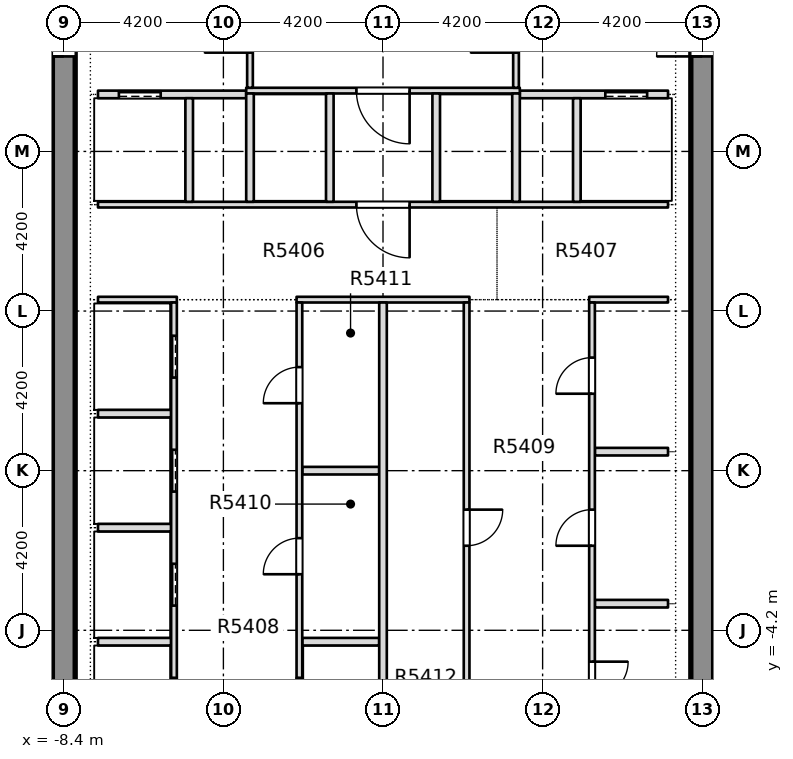
"""IFC4 building model, lengths in metres.
Left out: names, types, materials, properties, quantities, classifications, styles, units other than length and angle.
Written with IfcOpenShell. Run it as: python <this file> out.ifc"""

import sys

from ifc_helpers import new_model, si_unit, direction, frame, frame_2d, origin, place, context, subcontext, project, spatial, rectangle, extrude, element, fill, save


model = new_model("IFC4")
c1 = context("Model", 3, precision=1e-05, world=origin(), true_north=direction((0.0, 1.0)))
c2 = subcontext(c1, "Body", "Model", "MODEL_VIEW")
j1 = project(units=[si_unit("LENGTHUNIT", "METRE"), si_unit("PLANEANGLEUNIT", "RADIAN")], contexts=[c1])
p1 = place(None, origin())
s1 = spatial("IfcSite", under=j1, at=p1, CompositionType="ELEMENT")
p2 = place(p1, origin())
s2 = spatial("IfcBuilding", under=s1, at=p2, CompositionType="ELEMENT")
p3 = place(p2, frame((0.0, 0.0, 206.6)))
s3 = spatial("IfcBuildingStorey", under=s2, at=p3, CompositionType="ELEMENT", Elevation=206.6)
p4 = place(p3, frame((-8.4, -7.8, -0.4), z_axis=(0.0, 0.0, 1.0), x_axis=(0.0, 1.0, 0.0)))
e1 = element("IfcWall", 1, at=p4, inside=s3, PredefinedType="SHEAR", context=c2, shape_type="SweptSolid", body=[
    extrude(rectangle(XDim=28.95, YDim=0.6, at=frame_2d((14.475, 0.0))), origin(), (0.0, 0.0, 1.0), 3.45),
])
p5 = place(p4, frame((18.7, 0.0, 0.4)))
e2 = element("IfcOpeningElement", 2, at=p5, cuts=e1, PredefinedType="OPENING", context=c2, shape_type="SweptSolid", body=[
    extrude(rectangle(XDim=1.2, YDim=2.1, at=frame_2d((0.6, 1.05))), frame((0.0, 0.31, 0.0), z_axis=(0.0, -1.0, 0.0), x_axis=(1.0, 0.0, 0.0)), (0.0, 0.0, 1.0), 0.62),
])
p6 = place(p3, frame((8.4, -7.8, -0.4), z_axis=(0.0, 0.0, 1.0), x_axis=(0.0, 1.0, 0.0)))
e3 = element("IfcWall", 3, at=p6, inside=s3, PredefinedType="SHEAR", context=c2, shape_type="SweptSolid", body=[
    extrude(rectangle(XDim=28.95, YDim=0.6, at=frame_2d((14.475, 0.0))), origin(), (0.0, 0.0, 1.0), 3.45),
])
p7 = place(p6, frame((18.7, 0.0, 0.4)))
e4 = element("IfcOpeningElement", 4, at=p7, cuts=e3, PredefinedType="OPENING", context=c2, shape_type="SweptSolid", body=[
    extrude(rectangle(XDim=1.2, YDim=2.1, at=frame_2d((0.6, 1.05))), frame((0.0, 0.31, 0.0), z_axis=(0.0, -1.0, 0.0), x_axis=(1.0, 0.0, 0.0)), (0.0, 0.0, 1.0), 0.62),
])
p8 = place(p3, frame((-7.5, -4.5, 0.0), z_axis=(0.0, 0.0, 1.0), x_axis=(1.0, 0.0, 0.0)))
e5 = element("IfcWall", 5, at=p8, inside=s3, PredefinedType="PARTITIONING", context=c2, shape_type="SweptSolid", body=[
    extrude(rectangle(XDim=1.925, YDim=0.2, at=frame_2d((0.962, 0.0))), origin(), (0.0, 0.0, 1.0), 3.05),
])
p9 = place(p3, frame((-2.125, -4.5, 0.0), z_axis=(0.0, 0.0, 1.0), x_axis=(1.0, 0.0, 0.0)))
e6 = element("IfcWall", 6, at=p9, inside=s3, PredefinedType="PARTITIONING", context=c2, shape_type="SweptSolid", body=[
    extrude(rectangle(XDim=2.025, YDim=0.2, at=frame_2d((1.012, 0.0))), origin(), (0.0, 0.0, 1.0), 3.05),
])
for number, where, z_axis, x_axis in (
    (7, (5.575, -3.5, 0.0), (0.0, 0.0, 1.0), (1.0, 0.0, 0.0)),
    (8, (-7.5, -1.5, 0.0), (0.0, 0.0, 1.0), (1.0, 0.0, 0.0)),
):
    element("IfcWall", number, at=place(p3, frame(where, z_axis=z_axis, x_axis=x_axis)), inside=s3, PredefinedType="PARTITIONING", context=c2, shape_type="SweptSolid", body=[
        extrude(rectangle(XDim=1.925, YDim=0.2, at=frame_2d((0.962, 0.0))), origin(), (0.0, 0.0, 1.0), 3.05),
    ])
p10 = place(p3, frame((-2.125, 0.0, 0.0), z_axis=(0.0, 0.0, 1.0), x_axis=(1.0, 0.0, 0.0)))
e9 = element("IfcWall", 9, at=p10, inside=s3, PredefinedType="PARTITIONING", context=c2, shape_type="SweptSolid", body=[
    extrude(rectangle(XDim=2.025, YDim=0.2, at=frame_2d((1.012, 0.0))), origin(), (0.0, 0.0, 1.0), 3.05),
])
for number, where, z_axis, x_axis in (
    (10, (5.575, 0.5, 0.0), (0.0, 0.0, 1.0), (1.0, 0.0, 0.0)),
    (11, (-7.5, 1.5, 0.0), (0.0, 0.0, 1.0), (1.0, 0.0, 0.0)),
):
    element("IfcWall", number, at=place(p3, frame(where, z_axis=z_axis, x_axis=x_axis)), inside=s3, PredefinedType="PARTITIONING", context=c2, shape_type="SweptSolid", body=[
        extrude(rectangle(XDim=1.925, YDim=0.2, at=frame_2d((0.962, 0.0))), origin(), (0.0, 0.0, 1.0), 3.05),
    ])
p11 = place(p3, frame((-7.5, 4.5, 0.0), z_axis=(0.0, 0.0, 1.0), x_axis=(1.0, 0.0, 0.0)))
e12 = element("IfcWall", 12, at=p11, inside=s3, PredefinedType="PARTITIONING", context=c2, shape_type="SweptSolid", body=[
    extrude(rectangle(XDim=2.075, YDim=0.15, at=frame_2d((1.038, 0.0))), origin(), (0.0, 0.0, 1.0), 3.05),
])
p12 = place(p3, frame((-2.275, 4.5, 0.0), z_axis=(0.0, 0.0, 1.0), x_axis=(1.0, 0.0, 0.0)))
e13 = element("IfcWall", 13, at=p12, inside=s3, PredefinedType="PARTITIONING", context=c2, shape_type="SweptSolid", body=[
    extrude(rectangle(XDim=4.55, YDim=0.15, at=frame_2d((2.275, 0.0))), origin(), (0.0, 0.0, 1.0), 3.05),
])
p13 = place(p3, frame((5.425, 4.5, 0.0), z_axis=(0.0, 0.0, 1.0), x_axis=(1.0, 0.0, 0.0)))
e14 = element("IfcWall", 14, at=p13, inside=s3, PredefinedType="PARTITIONING", context=c2, shape_type="SweptSolid", body=[
    extrude(rectangle(XDim=2.075, YDim=0.15, at=frame_2d((1.038, 0.0))), origin(), (0.0, 0.0, 1.0), 3.05),
])
p14 = place(p3, frame((-7.5, 7.0, 0.0), z_axis=(0.0, 0.0, 1.0), x_axis=(1.0, 0.0, 0.0)))
e15 = element("IfcWall", 15, at=p14, inside=s3, PredefinedType="PARTITIONING", context=c2, shape_type="SweptSolid", body=[
    extrude(rectangle(XDim=15.0, YDim=0.15, at=frame_2d((7.5, 0.0))), origin(), (0.0, 0.0, 1.0), 3.05),
])
p15 = place(p14, frame((6.8, 0.0, 0.0)))
e16 = element("IfcOpeningElement", 16, at=p15, cuts=e15, PredefinedType="OPENING", context=c2, shape_type="SweptSolid", body=[
    extrude(rectangle(XDim=1.4, YDim=2.1, at=frame_2d((0.7, 1.05))), frame((0.0, 0.085, 0.0), z_axis=(0.0, -1.0, 0.0), x_axis=(1.0, 0.0, 0.0)), (0.0, 0.0, 1.0), 0.17),
])
p16 = place(p3, frame((-7.5, 9.9, 0.0), z_axis=(0.0, 0.0, 1.0), x_axis=(1.0, 0.0, 0.0)))
e17 = element("IfcWall", 17, at=p16, inside=s3, PredefinedType="PARTITIONING", context=c2, shape_type="SweptSolid", body=[
    extrude(rectangle(XDim=3.9, YDim=0.2, at=frame_2d((1.95, 0.0))), origin(), (0.0, 0.0, 1.0), 3.05),
])
p17 = place(p16, frame((0.55, 0.0, 0.0)))
e18 = element("IfcOpeningElement", 18, at=p17, cuts=e17, PredefinedType="OPENING", context=c2, shape_type="SweptSolid", body=[
    extrude(rectangle(XDim=1.1, YDim=2.1, at=frame_2d((0.55, 1.05))), frame((0.0, 0.11, 0.0), z_axis=(0.0, -1.0, 0.0), x_axis=(1.0, 0.0, 0.0)), (0.0, 0.0, 1.0), 0.22),
])
p18 = place(p3, frame((3.6, 9.9, 0.0), z_axis=(0.0, 0.0, 1.0), x_axis=(1.0, 0.0, 0.0)))
e19 = element("IfcWall", 19, at=p18, inside=s3, PredefinedType="PARTITIONING", context=c2, shape_type="SweptSolid", body=[
    extrude(rectangle(XDim=3.9, YDim=0.2, at=frame_2d((1.95, 0.0))), origin(), (0.0, 0.0, 1.0), 3.05),
])
p19 = place(p18, frame((2.25, 0.0, 0.0)))
e20 = element("IfcOpeningElement", 20, at=p19, cuts=e19, PredefinedType="OPENING", context=c2, shape_type="SweptSolid", body=[
    extrude(rectangle(XDim=1.1, YDim=2.1, at=frame_2d((0.55, 1.05))), frame((0.0, 0.11, 0.0), z_axis=(0.0, -1.0, 0.0), x_axis=(1.0, 0.0, 0.0)), (0.0, 0.0, 1.0), 0.22),
])
p20 = place(p3, frame((-3.6, 10.0, 0.0), z_axis=(0.0, 0.0, 1.0), x_axis=(1.0, 0.0, 0.0)))
e21 = element("IfcWall", 21, at=p20, inside=s3, PredefinedType="PARTITIONING", context=c2, shape_type="SweptSolid", body=[
    extrude(rectangle(XDim=7.2, YDim=0.15, at=frame_2d((3.6, 0.0))), origin(), (0.0, 0.0, 1.0), 3.05),
])
p21 = place(p20, frame((2.9, 0.0, 0.0)))
e22 = element("IfcOpeningElement", 22, at=p21, cuts=e21, PredefinedType="OPENING", context=c2, shape_type="SweptSolid", body=[
    extrude(rectangle(XDim=1.4, YDim=2.1, at=frame_2d((0.7, 1.05))), frame((0.0, 0.085, 0.0), z_axis=(0.0, -1.0, 0.0), x_axis=(1.0, 0.0, 0.0)), (0.0, 0.0, 1.0), 0.17),
])
p22 = place(p3, frame((-5.5, -7.799, 0.0), z_axis=(0.0, 0.0, 1.0), x_axis=(0.0, 1.0, 0.0)))
e23 = element("IfcWall", 23, at=p22, inside=s3, PredefinedType="PARTITIONING", context=c2, shape_type="SweptSolid", body=[
    extrude(rectangle(XDim=12.224, YDim=0.15, at=frame_2d((6.112, 0.0))), origin(), (0.0, 0.0, 1.0), 3.05),
])
p23 = place(p22, frame((1.249, 0.0, 0.0)))
e24 = element("IfcOpeningElement", 24, at=p23, cuts=e23, PredefinedType="OPENING", context=c2, shape_type="SweptSolid", body=[
    extrude(rectangle(XDim=1.1, YDim=2.1, at=frame_2d((0.55, 1.05))), frame((0.0, 0.085, 0.0), z_axis=(0.0, -1.0, 0.0), x_axis=(1.0, 0.0, 0.0)), (0.0, 0.0, 1.0), 0.17),
])
p24 = place(p22, frame((4.249, 0.0, 0.0)))
e25 = element("IfcOpeningElement", 25, at=p24, cuts=e23, PredefinedType="OPENING", context=c2, shape_type="SweptSolid", body=[
    extrude(rectangle(XDim=1.1, YDim=2.1, at=frame_2d((0.55, 1.05))), frame((0.0, 0.085, 0.0), z_axis=(0.0, -1.0, 0.0), x_axis=(1.0, 0.0, 0.0)), (0.0, 0.0, 1.0), 0.17),
])
p25 = place(p22, frame((7.249, 0.0, 0.0)))
e26 = element("IfcOpeningElement", 26, at=p25, cuts=e23, PredefinedType="OPENING", context=c2, shape_type="SweptSolid", body=[
    extrude(rectangle(XDim=1.1, YDim=2.1, at=frame_2d((0.55, 1.05))), frame((0.0, 0.085, 0.0), z_axis=(0.0, -1.0, 0.0), x_axis=(1.0, 0.0, 0.0)), (0.0, 0.0, 1.0), 0.17),
])
p26 = place(p22, frame((10.249, 0.0, 0.0)))
e27 = element("IfcOpeningElement", 27, at=p26, cuts=e23, PredefinedType="OPENING", context=c2, shape_type="SweptSolid", body=[
    extrude(rectangle(XDim=1.1, YDim=2.1, at=frame_2d((0.55, 1.05))), frame((0.0, 0.085, 0.0), z_axis=(0.0, -1.0, 0.0), x_axis=(1.0, 0.0, 0.0)), (0.0, 0.0, 1.0), 0.17),
])
p27 = place(p3, frame((-5.1, 7.075, 0.0), z_axis=(0.0, 0.0, 1.0), x_axis=(0.0, 1.0, 0.0)))
e28 = element("IfcWall", 28, at=p27, inside=s3, PredefinedType="PARTITIONING", context=c2, shape_type="SweptSolid", body=[
    extrude(rectangle(XDim=2.725, YDim=0.2, at=frame_2d((1.363, 0.0))), origin(), (0.0, 0.0, 1.0), 3.05),
])
p28 = place(p3, frame((-3.5, 7.075, 0.0), z_axis=(0.0, 0.0, 1.0), x_axis=(0.0, 1.0, 0.0)))
e29 = element("IfcWall", 29, at=p28, inside=s3, PredefinedType="PARTITIONING", context=c2, shape_type="SweptSolid", body=[
    extrude(rectangle(XDim=2.85, YDim=0.2, at=frame_2d((1.425, 0.0))), origin(), (0.0, 0.0, 1.0), 3.05),
])
p29 = place(p3, frame((-3.5, 10.075, 0.0), z_axis=(0.0, 0.0, 1.0), x_axis=(0.0, 1.0, 0.0)))
e30 = element("IfcWall", 30, at=p29, inside=s3, PredefinedType="PARTITIONING", context=c2, shape_type="SweptSolid", body=[
    extrude(rectangle(XDim=3.075, YDim=0.15, at=frame_2d((1.538, 0.0))), origin(), (0.0, 0.0, 1.0), 3.05),
])
p30 = place(p29, frame((0.925, 0.0, 0.0)))
e31 = element("IfcOpeningElement", 31, at=p30, cuts=e30, PredefinedType="OPENING", context=c2, shape_type="SweptSolid", body=[
    extrude(rectangle(XDim=1.2, YDim=2.1, at=frame_2d((0.6, 1.05))), frame((0.0, 0.085, 0.0), z_axis=(0.0, -1.0, 0.0), x_axis=(1.0, 0.0, 0.0)), (0.0, 0.0, 1.0), 0.17),
])
p31 = place(p3, frame((-2.2, -7.799, 0.0), z_axis=(0.0, 0.0, 1.0), x_axis=(0.0, 1.0, 0.0)))
e32 = element("IfcWall", 32, at=p31, inside=s3, PredefinedType="PARTITIONING", context=c2, shape_type="SweptSolid", body=[
    extrude(rectangle(XDim=12.224, YDim=0.15, at=frame_2d((6.112, 0.0))), origin(), (0.0, 0.0, 1.0), 3.05),
])
p32 = place(p31, frame((1.249, 0.0, 0.0)))
e33 = element("IfcOpeningElement", 33, at=p32, cuts=e32, PredefinedType="OPENING", context=c2, shape_type="SweptSolid", body=[
    extrude(rectangle(XDim=1.1, YDim=2.1, at=frame_2d((0.55, 1.05))), frame((0.0, 0.085, 0.0), z_axis=(0.0, -1.0, 0.0), x_axis=(1.0, 0.0, 0.0)), (0.0, 0.0, 1.0), 0.17),
])
p33 = place(p31, frame((5.074, 0.0, 0.0)))
e34 = element("IfcOpeningElement", 34, at=p33, cuts=e32, PredefinedType="OPENING", context=c2, shape_type="SweptSolid", body=[
    extrude(rectangle(XDim=0.95, YDim=2.1, at=frame_2d((0.475, 1.05))), frame((0.0, 0.085, 0.0), z_axis=(0.0, -1.0, 0.0), x_axis=(1.0, 0.0, 0.0)), (0.0, 0.0, 1.0), 0.17),
])
p34 = place(p31, frame((9.574, 0.0, 0.0)))
e35 = element("IfcOpeningElement", 35, at=p34, cuts=e32, PredefinedType="OPENING", context=c2, shape_type="SweptSolid", body=[
    extrude(rectangle(XDim=0.95, YDim=2.1, at=frame_2d((0.475, 1.05))), frame((0.0, 0.085, 0.0), z_axis=(0.0, -1.0, 0.0), x_axis=(1.0, 0.0, 0.0)), (0.0, 0.0, 1.0), 0.17),
])
p35 = place(p3, frame((-1.4, 7.075, 0.0), z_axis=(0.0, 0.0, 1.0), x_axis=(0.0, 1.0, 0.0)))
e36 = element("IfcWall", 36, at=p35, inside=s3, PredefinedType="PARTITIONING", context=c2, shape_type="SweptSolid", body=[
    extrude(rectangle(XDim=2.85, YDim=0.2, at=frame_2d((1.425, 0.0))), origin(), (0.0, 0.0, 1.0), 3.05),
])
p36 = place(p3, frame((0.0, -7.799, 0.0), z_axis=(0.0, 0.0, 1.0), x_axis=(0.0, 1.0, 0.0)))
e37 = element("IfcWall", 37, at=p36, inside=s3, PredefinedType="PARTITIONING", context=c2, shape_type="SweptSolid", body=[
    extrude(rectangle(XDim=12.224, YDim=0.2, at=frame_2d((6.112, 0.0))), origin(), (0.0, 0.0, 1.0), 3.05),
])
p37 = place(p3, frame((1.4, 7.075, 0.0), z_axis=(0.0, 0.0, 1.0), x_axis=(0.0, 1.0, 0.0)))
e38 = element("IfcWall", 38, at=p37, inside=s3, PredefinedType="PARTITIONING", context=c2, shape_type="SweptSolid", body=[
    extrude(rectangle(XDim=2.85, YDim=0.2, at=frame_2d((1.425, 0.0))), origin(), (0.0, 0.0, 1.0), 3.05),
])
p38 = place(p3, frame((2.2, -7.799, 0.0), z_axis=(0.0, 0.0, 1.0), x_axis=(0.0, 1.0, 0.0)))
e39 = element("IfcWall", 39, at=p38, inside=s3, PredefinedType="PARTITIONING", context=c2, shape_type="SweptSolid", body=[
    extrude(rectangle(XDim=12.224, YDim=0.15, at=frame_2d((6.112, 0.0))), origin(), (0.0, 0.0, 1.0), 3.05),
])
p39 = place(p38, frame((5.824, 0.0, 0.0)))
e40 = element("IfcOpeningElement", 40, at=p39, cuts=e39, PredefinedType="OPENING", context=c2, shape_type="SweptSolid", body=[
    extrude(rectangle(XDim=0.95, YDim=2.1, at=frame_2d((0.475, 1.05))), frame((0.0, 0.085, 0.0), z_axis=(0.0, -1.0, 0.0), x_axis=(1.0, 0.0, 0.0)), (0.0, 0.0, 1.0), 0.17),
])
p40 = place(p3, frame((3.5, 7.075, 0.0), z_axis=(0.0, 0.0, 1.0), x_axis=(0.0, 1.0, 0.0)))
e41 = element("IfcWall", 41, at=p40, inside=s3, PredefinedType="PARTITIONING", context=c2, shape_type="SweptSolid", body=[
    extrude(rectangle(XDim=2.85, YDim=0.2, at=frame_2d((1.425, 0.0))), origin(), (0.0, 0.0, 1.0), 3.05),
])
p41 = place(p3, frame((3.5, 10.075, 0.0), z_axis=(0.0, 0.0, 1.0), x_axis=(0.0, 1.0, 0.0)))
e42 = element("IfcWall", 42, at=p41, inside=s3, PredefinedType="PARTITIONING", context=c2, shape_type="SweptSolid", body=[
    extrude(rectangle(XDim=3.075, YDim=0.15, at=frame_2d((1.538, 0.0))), origin(), (0.0, 0.0, 1.0), 3.05),
])
p42 = place(p41, frame((0.925, 0.0, 0.0)))
e43 = element("IfcOpeningElement", 43, at=p42, cuts=e42, PredefinedType="OPENING", context=c2, shape_type="SweptSolid", body=[
    extrude(rectangle(XDim=1.2, YDim=2.1, at=frame_2d((0.6, 1.05))), frame((0.0, 0.085, 0.0), z_axis=(0.0, -1.0, 0.0), x_axis=(1.0, 0.0, 0.0)), (0.0, 0.0, 1.0), 0.17),
])
p43 = place(p3, frame((5.1, 7.075, 0.0), z_axis=(0.0, 0.0, 1.0), x_axis=(0.0, 1.0, 0.0)))
e44 = element("IfcWall", 44, at=p43, inside=s3, PredefinedType="PARTITIONING", context=c2, shape_type="SweptSolid", body=[
    extrude(rectangle(XDim=2.725, YDim=0.2, at=frame_2d((1.363, 0.0))), origin(), (0.0, 0.0, 1.0), 3.05),
])
p44 = place(p3, frame((5.5, -7.799, 0.0), z_axis=(0.0, 0.0, 1.0), x_axis=(0.0, 1.0, 0.0)))
e45 = element("IfcWall", 45, at=p44, inside=s3, PredefinedType="PARTITIONING", context=c2, shape_type="SweptSolid", body=[
    extrude(rectangle(XDim=12.224, YDim=0.15, at=frame_2d((6.112, 0.0))), origin(), (0.0, 0.0, 1.0), 3.05),
])
p45 = place(p44, frame((1.824, 0.0, 0.0)))
e46 = element("IfcOpeningElement", 46, at=p45, cuts=e45, PredefinedType="OPENING", context=c2, shape_type="SweptSolid", body=[
    extrude(rectangle(XDim=0.95, YDim=2.1, at=frame_2d((0.475, 1.05))), frame((0.0, 0.085, 0.0), z_axis=(0.0, -1.0, 0.0), x_axis=(1.0, 0.0, 0.0)), (0.0, 0.0, 1.0), 0.17),
])
p46 = place(p44, frame((5.824, 0.0, 0.0)))
e47 = element("IfcOpeningElement", 47, at=p46, cuts=e45, PredefinedType="OPENING", context=c2, shape_type="SweptSolid", body=[
    extrude(rectangle(XDim=0.95, YDim=2.1, at=frame_2d((0.475, 1.05))), frame((0.0, 0.085, 0.0), z_axis=(0.0, -1.0, 0.0), x_axis=(1.0, 0.0, 0.0)), (0.0, 0.0, 1.0), 0.17),
])
p47 = place(p44, frame((9.824, 0.0, 0.0)))
e48 = element("IfcOpeningElement", 48, at=p47, cuts=e45, PredefinedType="OPENING", context=c2, shape_type="SweptSolid", body=[
    extrude(rectangle(XDim=0.95, YDim=2.1, at=frame_2d((0.475, 1.05))), frame((0.0, 0.085, 0.0), z_axis=(0.0, -1.0, 0.0), x_axis=(1.0, 0.0, 0.0)), (0.0, 0.0, 1.0), 0.17),
])
p48 = place(p23, origin())
e49 = element("IfcDoor", 49, at=p48, inside=s3, OperationType="SLIDING_TO_LEFT", PredefinedType="DOOR", context=c2, shape_type="SweptSolid", body=[
    extrude(rectangle(XDim=1.1, YDim=2.1, at=frame_2d((0.55, 1.05))), frame((0.0, 0.025, 0.0), z_axis=(0.0, -1.0, 0.0), x_axis=(1.0, 0.0, 0.0)), (0.0, 0.0, 1.0), 0.05),
])
fill(e24, e49)
p49 = place(p24, origin())
e50 = element("IfcDoor", 50, at=p49, inside=s3, OperationType="SLIDING_TO_LEFT", PredefinedType="DOOR", context=c2, shape_type="SweptSolid", body=[
    extrude(rectangle(XDim=1.1, YDim=2.1, at=frame_2d((0.55, 1.05))), frame((0.0, 0.025, 0.0), z_axis=(0.0, -1.0, 0.0), x_axis=(1.0, 0.0, 0.0)), (0.0, 0.0, 1.0), 0.05),
])
fill(e25, e50)
p50 = place(p25, origin())
e51 = element("IfcDoor", 51, at=p50, inside=s3, OperationType="SLIDING_TO_LEFT", PredefinedType="DOOR", context=c2, shape_type="SweptSolid", body=[
    extrude(rectangle(XDim=1.1, YDim=2.1, at=frame_2d((0.55, 1.05))), frame((0.0, 0.025, 0.0), z_axis=(0.0, -1.0, 0.0), x_axis=(1.0, 0.0, 0.0)), (0.0, 0.0, 1.0), 0.05),
])
fill(e26, e51)
p51 = place(p26, origin())
e52 = element("IfcDoor", 52, at=p51, inside=s3, OperationType="SLIDING_TO_LEFT", PredefinedType="DOOR", context=c2, shape_type="SweptSolid", body=[
    extrude(rectangle(XDim=1.1, YDim=2.1, at=frame_2d((0.55, 1.05))), frame((0.0, 0.025, 0.0), z_axis=(0.0, -1.0, 0.0), x_axis=(1.0, 0.0, 0.0)), (0.0, 0.0, 1.0), 0.05),
])
fill(e27, e52)
p52 = place(p32, origin())
e53 = element("IfcDoor", 53, at=p52, inside=s3, OperationType="SLIDING_TO_LEFT", PredefinedType="DOOR", context=c2, shape_type="SweptSolid", body=[
    extrude(rectangle(XDim=1.1, YDim=2.1, at=frame_2d((0.55, 1.05))), frame((0.0, 0.025, 0.0), z_axis=(0.0, -1.0, 0.0), x_axis=(1.0, 0.0, 0.0)), (0.0, 0.0, 1.0), 0.05),
])
fill(e33, e53)
p53 = place(p33, origin())
e54 = element("IfcDoor", 54, at=p53, inside=s3, OperationType="SINGLE_SWING_LEFT", PredefinedType="DOOR", context=c2, shape_type="SweptSolid", body=[
    extrude(rectangle(XDim=0.95, YDim=2.1, at=frame_2d((0.475, 1.05))), frame((0.0, 0.025, 0.0), z_axis=(0.0, -1.0, 0.0), x_axis=(1.0, 0.0, 0.0)), (0.0, 0.0, 1.0), 0.05),
])
fill(e34, e54)
p54 = place(p34, origin())
e55 = element("IfcDoor", 55, at=p54, inside=s3, OperationType="SINGLE_SWING_RIGHT", PredefinedType="DOOR", context=c2, shape_type="SweptSolid", body=[
    extrude(rectangle(XDim=0.95, YDim=2.1, at=frame_2d((0.475, 1.05))), frame((0.0, 0.025, 0.0), z_axis=(0.0, -1.0, 0.0), x_axis=(1.0, 0.0, 0.0)), (0.0, 0.0, 1.0), 0.05),
])
fill(e35, e55)
p55 = place(p39, origin())
e56 = element("IfcDoor", 56, at=p55, inside=s3, OperationType="SINGLE_SWING_RIGHT", PredefinedType="DOOR", context=c2, shape_type="SweptSolid", body=[
    extrude(rectangle(XDim=0.95, YDim=2.1, at=frame_2d((0.475, 1.05))), frame((0.0, 0.025, 0.0), z_axis=(0.0, -1.0, 0.0), x_axis=(1.0, 0.0, 0.0)), (0.0, 0.0, 1.0), 0.05),
])
fill(e40, e56)
p56 = place(p45, origin())
e57 = element("IfcDoor", 57, at=p56, inside=s3, OperationType="SINGLE_SWING_LEFT", PredefinedType="DOOR", context=c2, shape_type="SweptSolid", body=[
    extrude(rectangle(XDim=0.95, YDim=2.1, at=frame_2d((0.475, 1.05))), frame((0.0, 0.025, 0.0), z_axis=(0.0, -1.0, 0.0), x_axis=(1.0, 0.0, 0.0)), (0.0, 0.0, 1.0), 0.05),
])
fill(e46, e57)
p57 = place(p46, origin())
e58 = element("IfcDoor", 58, at=p57, inside=s3, OperationType="SINGLE_SWING_LEFT", PredefinedType="DOOR", context=c2, shape_type="SweptSolid", body=[
    extrude(rectangle(XDim=0.95, YDim=2.1, at=frame_2d((0.475, 1.05))), frame((0.0, 0.025, 0.0), z_axis=(0.0, -1.0, 0.0), x_axis=(1.0, 0.0, 0.0)), (0.0, 0.0, 1.0), 0.05),
])
fill(e47, e58)
p58 = place(p47, origin())
e59 = element("IfcDoor", 59, at=p58, inside=s3, OperationType="SINGLE_SWING_RIGHT", PredefinedType="DOOR", context=c2, shape_type="SweptSolid", body=[
    extrude(rectangle(XDim=0.95, YDim=2.1, at=frame_2d((0.475, 1.05))), frame((0.0, 0.025, 0.0), z_axis=(0.0, -1.0, 0.0), x_axis=(1.0, 0.0, 0.0)), (0.0, 0.0, 1.0), 0.05),
])
fill(e48, e59)
p59 = place(p17, origin())
e60 = element("IfcDoor", 60, at=p59, inside=s3, OperationType="SLIDING_TO_RIGHT", PredefinedType="DOOR", context=c2, shape_type="SweptSolid", body=[
    extrude(rectangle(XDim=1.1, YDim=2.1, at=frame_2d((0.55, 1.05))), frame((0.0, 0.025, 0.0), z_axis=(0.0, -1.0, 0.0), x_axis=(1.0, 0.0, 0.0)), (0.0, 0.0, 1.0), 0.05),
])
fill(e18, e60)
p60 = place(p19, origin())
e61 = element("IfcDoor", 61, at=p60, inside=s3, OperationType="SLIDING_TO_LEFT", PredefinedType="DOOR", context=c2, shape_type="SweptSolid", body=[
    extrude(rectangle(XDim=1.1, YDim=2.1, at=frame_2d((0.55, 1.05))), frame((0.0, 0.025, 0.0), z_axis=(0.0, -1.0, 0.0), x_axis=(1.0, 0.0, 0.0)), (0.0, 0.0, 1.0), 0.05),
])
fill(e20, e61)
p61 = place(p15, origin())
e62 = element("IfcDoor", 62, at=p61, inside=s3, OperationType="SINGLE_SWING_RIGHT", PredefinedType="DOOR", context=c2, shape_type="SweptSolid", body=[
    extrude(rectangle(XDim=1.4, YDim=2.1, at=frame_2d((0.7, 1.05))), frame((0.0, 0.025, 0.0), z_axis=(0.0, -1.0, 0.0), x_axis=(1.0, 0.0, 0.0)), (0.0, 0.0, 1.0), 0.05),
])
fill(e16, e62)
p62 = place(p21, origin())
e63 = element("IfcDoor", 63, at=p62, inside=s3, OperationType="SINGLE_SWING_RIGHT", PredefinedType="DOOR", context=c2, shape_type="SweptSolid", body=[
    extrude(rectangle(XDim=1.4, YDim=2.1, at=frame_2d((0.7, 1.05))), frame((0.0, 0.025, 0.0), z_axis=(0.0, -1.0, 0.0), x_axis=(1.0, 0.0, 0.0)), (0.0, 0.0, 1.0), 0.05),
])
fill(e22, e63)
p63 = place(p5, origin())
e64 = element("IfcDoor", 64, at=p63, inside=s3, OperationType="SINGLE_SWING_LEFT", PredefinedType="DOOR", context=c2, shape_type="SweptSolid", body=[
    extrude(rectangle(XDim=1.2, YDim=2.1, at=frame_2d((0.6, 1.05))), frame((0.0, 0.025, 0.0), z_axis=(0.0, -1.0, 0.0), x_axis=(1.0, 0.0, 0.0)), (0.0, 0.0, 1.0), 0.05),
])
fill(e2, e64)
p64 = place(p7, origin())
e65 = element("IfcDoor", 65, at=p64, inside=s3, OperationType="SINGLE_SWING_LEFT", PredefinedType="DOOR", context=c2, shape_type="SweptSolid", body=[
    extrude(rectangle(XDim=1.2, YDim=2.1, at=frame_2d((0.6, 1.05))), frame((0.0, 0.025, 0.0), z_axis=(0.0, -1.0, 0.0), x_axis=(1.0, 0.0, 0.0)), (0.0, 0.0, 1.0), 0.05),
])
fill(e4, e65)
save(model, sys.argv[1])
